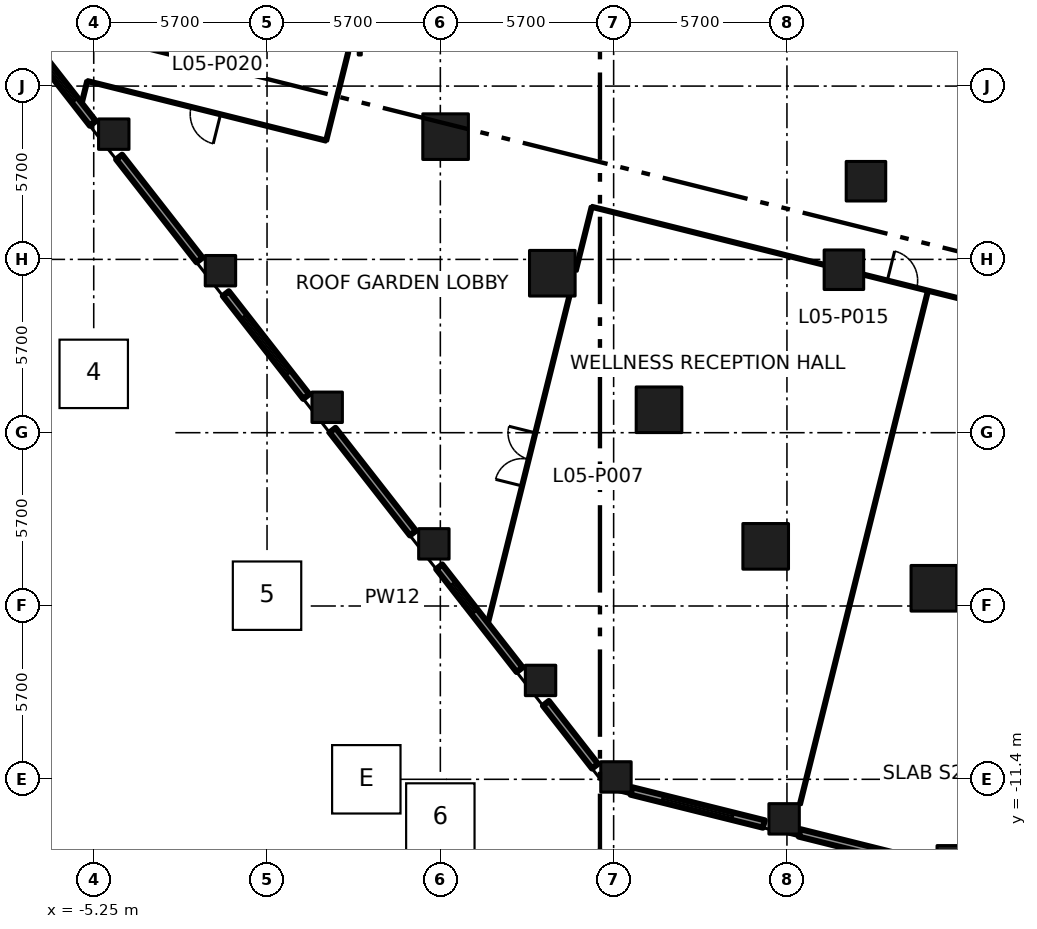
"""IFC4 building model, lengths in metres.
Left out: names, types, materials, properties, quantities, classifications, styles, units other than length and angle.
Written with IfcOpenShell. Run it as: python <this file> out.ifc"""

import sys

from ifc_helpers import new_model, si_unit, direction, frame, frame_2d, origin, origin_2d, place, context, subcontext, project, spatial, rectangle, extrude, element, fill, save


model = new_model("IFC4")
c1 = context("Model", 3, precision=1e-05, world=origin(), true_north=direction((0.0, 1.0)))
c2 = subcontext(c1, "Body", "Model", "MODEL_VIEW")
j1 = project(units=[si_unit("LENGTHUNIT", "METRE"), si_unit("PLANEANGLEUNIT", "RADIAN")], contexts=[c1])
p1 = place(None, origin())
s1 = spatial("IfcSite", under=j1, at=p1, CompositionType="ELEMENT")
p2 = place(p1, origin())
s2 = spatial("IfcBuilding", under=s1, at=p2, CompositionType="ELEMENT")
p3 = place(p2, frame((0.0, 0.0, 28.2)))
s3 = spatial("IfcBuildingStorey", under=s2, at=p3, CompositionType="ELEMENT", Elevation=28.2)
for number, where, z_axis, x_axis in (
    (1, (16.851, -3.738, 0.0), (0.0, 0.0, 1.0), (1.0, 0.0, 0.0)),
    (2, (13.342, 0.754, 0.0), (0.0, 0.0, 1.0), (1.0, 0.0, 0.0)),
    (3, (9.833, 5.245, 0.0), (0.0, 0.0, 1.0), (1.0, 0.0, 0.0)),
    (4, (6.323, 9.737, 0.0), (0.0, 0.0, 1.0), (1.0, 0.0, 0.0)),
    (5, (22.382, -5.117, 0.0), (0.0, 0.0, 1.0), (1.0, 0.0, 0.0)),
):
    element("IfcColumn", number, at=place(p3, frame(where, z_axis=z_axis, x_axis=x_axis)), inside=s3, PredefinedType="COLUMN", context=c2, shape_type="SweptSolid", body=[
        extrude(rectangle(XDim=1.5, YDim=1.5, at=origin_2d()), origin(), (0.0, 0.0, 1.0), 4.8),
    ])
for number, where, z_axis, x_axis in (
    (6, (19.424, 5.36, 0.0), (0.0, 0.0, 1.0), (1.0, 0.0, 0.0)),
    (7, (20.149, 8.271, 0.0), (0.0, 0.0, 1.0), (1.0, 0.0, 0.0)),
):
    element("IfcColumn", number, at=place(p3, frame(where, z_axis=z_axis, x_axis=x_axis)), inside=s3, PredefinedType="COLUMN", context=c2, shape_type="SweptSolid", body=[
        extrude(rectangle(XDim=1.3, YDim=1.3, at=origin_2d()), origin(), (0.0, 0.0, 1.0), 4.8),
    ])
for number, where, z_axis, x_axis in (
    (8, (-4.591, 9.819, 0.0), (0.0, 0.0, 1.0), (1.0, 0.0, 0.0)),
    (9, (-1.082, 5.328, 0.0), (0.0, 0.0, 1.0), (1.0, 0.0, 0.0)),
    (10, (2.428, 0.836, 0.0), (0.0, 0.0, 1.0), (1.0, 0.0, 0.0)),
    (11, (5.937, -3.656, 0.0), (0.0, 0.0, 1.0), (1.0, 0.0, 0.0)),
    (12, (9.446, -8.148, 0.0), (0.0, 0.0, 1.0), (1.0, 0.0, 0.0)),
    (13, (11.926, -11.322, 0.0), (0.0, 0.0, 1.0), (1.0, 0.0, 0.0)),
    (14, (17.457, -12.701, 0.0), (0.0, 0.0, 1.0), (1.0, 0.0, 0.0)),
    (15, (22.987, -14.08, 0.0), (0.0, 0.0, 1.0), (1.0, 0.0, 0.0)),
):
    element("IfcColumn", number, at=place(p3, frame(where, z_axis=z_axis, x_axis=x_axis)), inside=s3, PredefinedType="COLUMN", context=c2, shape_type="SweptSolid", body=[
        extrude(rectangle(XDim=1.0, YDim=1.0, at=origin_2d()), origin(), (0.0, 0.0, 1.0), 4.8),
    ])
p4 = place(p3, frame((-5.464, 11.565, 0.0), z_axis=(0.0, 0.0, 1.0), x_axis=(-0.24207252228, -0.970258158408, 0.0)))
e16 = element("IfcWall", 16, at=p4, inside=s3, PredefinedType="PARTITIONING", context=c2, shape_type="SweptSolid", body=[
    extrude(rectangle(XDim=0.744, YDim=0.1, at=frame_2d((0.372, 0.0))), origin(), (0.0, 0.0, 1.0), 4.35),
])
p5 = place(p3, frame((2.395, 9.606, 0.0), z_axis=(0.0, 0.0, 1.0), x_axis=(-0.97031070843, 0.241861797535, 0.0)))
e17 = element("IfcWall", 17, at=p5, inside=s3, PredefinedType="PARTITIONING", context=c2, shape_type="SweptSolid", body=[
    extrude(rectangle(XDim=8.1, YDim=0.1, at=frame_2d((4.05, 0.0))), origin(), (0.0, 0.0, 1.0), 4.35),
])
p6 = place(p5, frame((3.58, 0.0, 0.0)))
e18 = element("IfcOpeningElement", 18, at=p6, cuts=e17, PredefinedType="OPENING", context=c2, shape_type="SweptSolid", body=[
    extrude(rectangle(XDim=1.0, YDim=2.1, at=frame_2d((0.5, 1.05))), frame((0.0, 0.06, 0.0), z_axis=(0.0, -1.0, 0.0), x_axis=(1.0, 0.0, 0.0)), (0.0, 0.0, 1.0), 0.12),
])
p7 = place(p3, frame((3.121, 12.517, 0.0), z_axis=(0.0, 0.0, 1.0), x_axis=(-0.241999491975, -0.970276376031, 0.0)))
e19 = element("IfcWall", 19, at=p7, inside=s3, PredefinedType="PARTITIONING", context=c2, shape_type="SweptSolid", body=[
    extrude(rectangle(XDim=3.0, YDim=0.1, at=frame_2d((1.5, 0.0))), origin(), (0.0, 0.0, 1.0), 4.35),
])
p8 = place(p3, frame((3.5, 13.459, 0.0), z_axis=(0.0, 0.0, 1.0), x_axis=(0.0, -1.0, 0.0)))
e20 = element("IfcWall", 20, at=p8, inside=s3, PredefinedType="PARTITIONING", context=c2, shape_type="SweptSolid", body=[
    extrude(rectangle(XDim=1.036, YDim=0.1, at=frame_2d((0.518, 0.0))), origin(), (0.0, 0.0, 1.0), 4.35),
])
p9 = place(p3, frame((7.716, -6.257, 0.0), z_axis=(0.0, 0.0, 1.0), x_axis=(0.241891576484, 0.970303285177, 0.0)))
e21 = element("IfcWall", 21, at=p9, inside=s3, PredefinedType="PARTITIONING", context=c2, shape_type="SweptSolid", body=[
    extrude(rectangle(XDim=11.061, YDim=0.1, at=frame_2d((5.53, 0.0))), origin(), (0.0, 0.0, 1.0), 4.35),
])
p10 = place(p9, frame((4.644, 0.0, 0.0)))
e22 = element("IfcOpeningElement", 22, at=p10, cuts=e21, PredefinedType="OPENING", context=c2, shape_type="SweptSolid", body=[
    extrude(rectangle(XDim=1.8, YDim=2.1, at=frame_2d((0.9, 1.05))), frame((0.0, 0.06, 0.0), z_axis=(0.0, -1.0, 0.0), x_axis=(1.0, 0.0, 0.0)), (0.0, 0.0, 1.0), 0.12),
])
p11 = place(p3, frame((10.603, 5.323, 0.0), z_axis=(0.0, 0.0, 1.0), x_axis=(0.241847407238, 0.970314295273, 0.0)))
e23 = element("IfcWall", 23, at=p11, inside=s3, PredefinedType="PARTITIONING", context=c2, shape_type="SweptSolid", body=[
    extrude(rectangle(XDim=2.17, YDim=0.1, at=frame_2d((1.085, 0.0))), origin(), (0.0, 0.0, 1.0), 4.35),
])
p12 = place(p3, frame((11.128, 7.429, 0.0), z_axis=(0.0, 0.0, 1.0), x_axis=(0.970281210621, -0.241980107272, 0.0)))
e24 = element("IfcWall", 24, at=p12, inside=s3, PredefinedType="PARTITIONING", context=c2, shape_type="SweptSolid", body=[
    extrude(rectangle(XDim=7.86, YDim=0.1, at=frame_2d((3.93, 0.0))), origin(), (0.0, 0.0, 1.0), 4.35),
])
p13 = place(p3, frame((20.094, 5.193, 0.0), z_axis=(0.0, 0.0, 1.0), x_axis=(0.970321828551, -0.241817181023, 0.0)))
e25 = element("IfcWall", 25, at=p13, inside=s3, PredefinedType="PARTITIONING", context=c2, shape_type="SweptSolid", body=[
    extrude(rectangle(XDim=4.318, YDim=0.1, at=frame_2d((2.159, 0.0))), origin(), (0.0, 0.0, 1.0), 4.35),
])
p14 = place(p13, frame((0.78, 0.0, 0.0)))
e26 = element("IfcOpeningElement", 26, at=p14, cuts=e25, PredefinedType="OPENING", context=c2, shape_type="SweptSolid", body=[
    extrude(rectangle(XDim=1.0, YDim=2.1, at=frame_2d((0.5, 1.05))), frame((0.0, 0.06, 0.0), z_axis=(0.0, -1.0, 0.0), x_axis=(1.0, 0.0, 0.0)), (0.0, 0.0, 1.0), 0.12),
])
p15 = place(p3, frame((17.977, -12.223, 0.0), z_axis=(0.0, 0.0, 1.0), x_axis=(0.241923428609, 0.970295344053, 0.0)))
e27 = element("IfcWall", 27, at=p15, inside=s3, PredefinedType="PARTITIONING", context=c2, shape_type="SweptSolid", body=[
    extrude(rectangle(XDim=17.361, YDim=0.1, at=frame_2d((8.68, 0.0))), origin(), (0.0, 0.0, 1.0), 4.35),
])
p16 = place(p3, frame((-7.924, 13.558, 0.0), z_axis=(0.0, 0.0, 1.0), x_axis=(0.615603242749, -0.788056246417, 0.0)))
e28 = element("IfcWall", 28, at=p16, inside=s3, PredefinedType="SOLIDWALL", context=c2, shape_type="SweptSolid", body=[
    extrude(rectangle(XDim=4.297, YDim=0.25, at=frame_2d((2.148, 0.0))), origin(), (0.0, 0.0, 1.0), 3.45),
])
p17 = place(p16, frame((0.948, 0.0, 0.9)))
e29 = element("IfcOpeningElement", 29, at=p17, cuts=e28, PredefinedType="OPENING", context=c2, shape_type="SweptSolid", body=[
    extrude(rectangle(XDim=2.4, YDim=2.1, at=frame_2d((1.2, 1.05))), frame((0.0, 0.135, 0.0), z_axis=(0.0, -1.0, 0.0), x_axis=(1.0, 0.0, 0.0)), (0.0, 0.0, 1.0), 0.27),
])
p18 = place(p3, frame((-4.415, 9.066, 0.0), z_axis=(0.0, 0.0, 1.0), x_axis=(0.615713519567, -0.787970089421, 0.0)))
e30 = element("IfcWall", 30, at=p18, inside=s3, PredefinedType="SOLIDWALL", context=c2, shape_type="SweptSolid", body=[
    extrude(rectangle(XDim=4.296, YDim=0.25, at=frame_2d((2.148, 0.0))), origin(), (0.0, 0.0, 1.0), 3.45),
])
p19 = place(p3, frame((-0.906, 4.575, 0.0), z_axis=(0.0, 0.0, 1.0), x_axis=(0.61574436495, -0.787945986113, 0.0)))
e31 = element("IfcWall", 31, at=p19, inside=s3, PredefinedType="SOLIDWALL", context=c2, shape_type="SweptSolid", body=[
    extrude(rectangle(XDim=4.297, YDim=0.25, at=frame_2d((2.148, 0.0))), origin(), (0.0, 0.0, 1.0), 3.45),
])
p20 = place(p19, frame((0.949, 0.0, 0.9)))
e32 = element("IfcOpeningElement", 32, at=p20, cuts=e31, PredefinedType="OPENING", context=c2, shape_type="SweptSolid", body=[
    extrude(rectangle(XDim=2.4, YDim=2.1, at=frame_2d((1.2, 1.05))), frame((0.0, 0.135, 0.0), z_axis=(0.0, -1.0, 0.0), x_axis=(1.0, 0.0, 0.0)), (0.0, 0.0, 1.0), 0.27),
])
p21 = place(p3, frame((2.604, 0.083, 0.0), z_axis=(0.0, 0.0, 1.0), x_axis=(0.615603242749, -0.788056246417, 0.0)))
e33 = element("IfcWall", 33, at=p21, inside=s3, PredefinedType="SOLIDWALL", context=c2, shape_type="SweptSolid", body=[
    extrude(rectangle(XDim=4.297, YDim=0.25, at=frame_2d((2.148, 0.0))), origin(), (0.0, 0.0, 1.0), 3.45),
])
p22 = place(p3, frame((6.113, -4.409, 0.0), z_axis=(0.0, 0.0, 1.0), x_axis=(0.615603242749, -0.788056246417, 0.0)))
e34 = element("IfcWall", 34, at=p22, inside=s3, PredefinedType="SOLIDWALL", context=c2, shape_type="SweptSolid", body=[
    extrude(rectangle(XDim=4.297, YDim=0.25, at=frame_2d((2.148, 0.0))), origin(), (0.0, 0.0, 1.0), 3.45),
])
p23 = place(p22, frame((0.702, 0.0, 0.9)))
e35 = element("IfcOpeningElement", 35, at=p23, cuts=e34, PredefinedType="OPENING", context=c2, shape_type="SweptSolid", body=[
    extrude(rectangle(XDim=1.2, YDim=2.1, at=frame_2d((0.6, 1.05))), frame((0.0, 0.135, 0.0), z_axis=(0.0, -1.0, 0.0), x_axis=(1.0, 0.0, 0.0)), (0.0, 0.0, 1.0), 0.27),
])
p24 = place(p3, frame((9.622, -8.901, 0.0), z_axis=(0.0, 0.0, 1.0), x_axis=(0.615703609525, -0.787977832948, 0.0)))
e36 = element("IfcWall", 36, at=p24, inside=s3, PredefinedType="SOLIDWALL", context=c2, shape_type="SweptSolid", body=[
    extrude(rectangle(XDim=2.625, YDim=0.25, at=frame_2d((1.312, 0.0))), origin(), (0.0, 0.0, 1.0), 3.45),
])
p25 = place(p3, frame((12.436, -11.784, 0.0), z_axis=(0.0, 0.0, 1.0), x_axis=(0.970263990019, -0.242049147224, 0.0)))
e37 = element("IfcWall", 37, at=p25, inside=s3, PredefinedType="SOLIDWALL", context=c2, shape_type="SweptSolid", body=[
    extrude(rectangle(XDim=4.488, YDim=0.25, at=frame_2d((2.244, 0.0))), origin(), (0.0, 0.0, 1.0), 3.45),
])
p26 = place(p25, frame((1.044, 0.0, 0.9)))
e38 = element("IfcOpeningElement", 38, at=p26, cuts=e37, PredefinedType="OPENING", context=c2, shape_type="SweptSolid", body=[
    extrude(rectangle(XDim=2.4, YDim=2.1, at=frame_2d((1.2, 1.05))), frame((0.0, 0.135, 0.0), z_axis=(0.0, -1.0, 0.0), x_axis=(1.0, 0.0, 0.0)), (0.0, 0.0, 1.0), 0.27),
])
p27 = place(p3, frame((17.967, -13.163, 0.0), z_axis=(0.0, 0.0, 1.0), x_axis=(0.970315118421, -0.24184410467, 0.0)))
e39 = element("IfcWall", 39, at=p27, inside=s3, PredefinedType="SOLIDWALL", context=c2, shape_type="SweptSolid", body=[
    extrude(rectangle(XDim=4.486, YDim=0.25, at=frame_2d((2.243, 0.0))), origin(), (0.0, 0.0, 1.0), 3.45),
])
p28 = place(p10, origin())
e40 = element("IfcDoor", 40, at=p28, inside=s3, OperationType="DOUBLE_DOOR_SINGLE_SWING", PredefinedType="DOOR", context=c2, shape_type="SweptSolid", body=[
    extrude(rectangle(XDim=1.8, YDim=2.1, at=frame_2d((0.9, 1.05))), frame((0.0, 0.025, 0.0), z_axis=(0.0, -1.0, 0.0), x_axis=(1.0, 0.0, 0.0)), (0.0, 0.0, 1.0), 0.05),
])
fill(e22, e40)
p29 = place(p14, origin())
e41 = element("IfcDoor", 41, at=p29, inside=s3, OperationType="SINGLE_SWING_LEFT", PredefinedType="DOOR", context=c2, shape_type="SweptSolid", body=[
    extrude(rectangle(XDim=1.0, YDim=2.1, at=frame_2d((0.5, 1.05))), frame((0.0, 0.025, 0.0), z_axis=(0.0, -1.0, 0.0), x_axis=(1.0, 0.0, 0.0)), (0.0, 0.0, 1.0), 0.05),
])
fill(e26, e41)
p30 = place(p6, origin())
e42 = element("IfcDoor", 42, at=p30, inside=s3, OperationType="SINGLE_SWING_LEFT", PredefinedType="DOOR", context=c2, shape_type="SweptSolid", body=[
    extrude(rectangle(XDim=1.0, YDim=2.1, at=frame_2d((0.5, 1.05))), frame((0.0, 0.025, 0.0), z_axis=(0.0, -1.0, 0.0), x_axis=(1.0, 0.0, 0.0)), (0.0, 0.0, 1.0), 0.05),
])
fill(e18, e42)
p31 = place(p17, origin())
e43 = element("IfcWindow", 43, at=p31, inside=s3, PartitioningType="DOUBLE_PANEL_VERTICAL", PredefinedType="WINDOW", context=c2, shape_type="SweptSolid", body=[
    extrude(rectangle(XDim=2.4, YDim=2.1, at=frame_2d((1.2, 1.05))), frame((0.0, 0.03, 0.0), z_axis=(0.0, -1.0, 0.0), x_axis=(1.0, 0.0, 0.0)), (0.0, 0.0, 1.0), 0.06),
])
fill(e29, e43)
p32 = place(p20, origin())
e44 = element("IfcWindow", 44, at=p32, inside=s3, PartitioningType="DOUBLE_PANEL_VERTICAL", PredefinedType="WINDOW", context=c2, shape_type="SweptSolid", body=[
    extrude(rectangle(XDim=2.4, YDim=2.1, at=frame_2d((1.2, 1.05))), frame((0.0, 0.03, 0.0), z_axis=(0.0, -1.0, 0.0), x_axis=(1.0, 0.0, 0.0)), (0.0, 0.0, 1.0), 0.06),
])
fill(e32, e44)
p33 = place(p23, origin())
e45 = element("IfcWindow", 45, at=p33, inside=s3, PartitioningType="SINGLE_PANEL", PredefinedType="WINDOW", context=c2, shape_type="SweptSolid", body=[
    extrude(rectangle(XDim=1.2, YDim=2.1, at=frame_2d((0.6, 1.05))), frame((0.0, 0.03, 0.0), z_axis=(0.0, -1.0, 0.0), x_axis=(1.0, 0.0, 0.0)), (0.0, 0.0, 1.0), 0.06),
])
fill(e35, e45)
p34 = place(p26, origin())
e46 = element("IfcWindow", 46, at=p34, inside=s3, PartitioningType="DOUBLE_PANEL_VERTICAL", PredefinedType="WINDOW", context=c2, shape_type="SweptSolid", body=[
    extrude(rectangle(XDim=2.4, YDim=2.1, at=frame_2d((1.2, 1.05))), frame((0.0, 0.03, 0.0), z_axis=(0.0, -1.0, 0.0), x_axis=(1.0, 0.0, 0.0)), (0.0, 0.0, 1.0), 0.06),
])
fill(e38, e46)
save(model, sys.argv[1])
